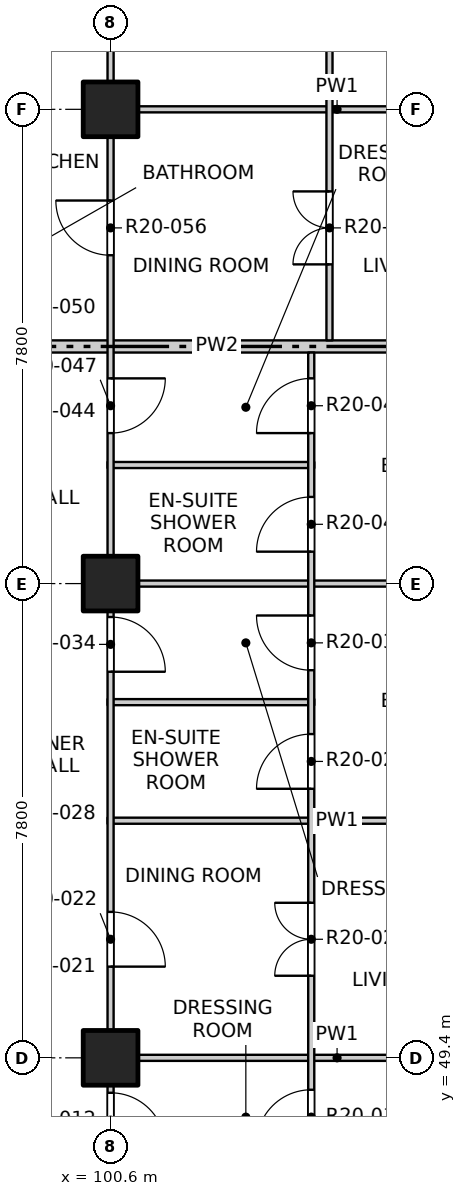
"""IFC4 building model, lengths in metres.
Left out: names, types, materials, properties, quantities, classifications, styles, units other than length and angle.
Written with IfcOpenShell. Run it as: python <this file> out.ifc"""

import sys

from ifc_helpers import new_model, si_unit, direction, frame, frame_2d, origin, origin_2d, place, context, subcontext, project, spatial, rectangle, extrude, element, fill, save


model = new_model("IFC4")
c1 = context("Model", 3, precision=1e-05, world=origin(), true_north=direction((0.0, 1.0)))
c2 = subcontext(c1, "Body", "Model", "MODEL_VIEW")
j1 = project(units=[si_unit("LENGTHUNIT", "METRE"), si_unit("PLANEANGLEUNIT", "RADIAN")], contexts=[c1])
p1 = place(None, origin())
s1 = spatial("IfcSite", under=j1, at=p1, CompositionType="ELEMENT")
p2 = place(p1, origin())
s2 = spatial("IfcBuilding", under=s1, at=p2, CompositionType="ELEMENT")
p3 = place(p2, frame((0.0, 0.0, 210.9)))
s3 = spatial("IfcBuildingStorey", under=s2, at=p3, CompositionType="ELEMENT", Elevation=210.9)
for number, where, z_axis, x_axis in (
    (1, (100.6, 49.4, -0.25), (0.0, 0.0, 1.0), (1.0, 0.0, 0.0)),
    (2, (100.6, 57.2, -0.25), (0.0, 0.0, 1.0), (1.0, 0.0, 0.0)),
    (3, (100.6, 65.0, -0.25), (0.0, 0.0, 1.0), (1.0, 0.0, 0.0)),
):
    element("IfcColumn", number, at=place(p3, frame(where, z_axis=z_axis, x_axis=x_axis)), inside=s3, PredefinedType="COLUMN", context=c2, shape_type="SweptSolid", body=[
        extrude(rectangle(XDim=0.9, YDim=0.9, at=origin_2d()), origin(), (0.0, 0.0, 1.0), 3.4),
    ])
for number, where, z_axis, x_axis in (
    (4, (100.55, 49.4, 0.0), (0.0, 0.0, 1.0), (1.0, 0.0, 0.0)),
    (5, (100.55, 53.3, 0.0), (0.0, 0.0, 1.0), (1.0, 0.0, 0.0)),
):
    element("IfcWall", number, at=place(p3, frame(where, z_axis=z_axis, x_axis=x_axis)), inside=s3, PredefinedType="PARTITIONING", context=c2, shape_type="SweptSolid", body=[
        extrude(rectangle(XDim=7.55, YDim=0.1, at=frame_2d((3.775, 0.0))), origin(), (0.0, 0.0, 1.0), 3.15),
    ])
p4 = place(p3, frame((100.55, 55.25, 0.0), z_axis=(0.0, 0.0, 1.0), x_axis=(1.0, 0.0, 0.0)))
e6 = element("IfcWall", 6, at=p4, inside=s3, PredefinedType="PARTITIONING", context=c2, shape_type="SweptSolid", body=[
    extrude(rectangle(XDim=3.4, YDim=0.1, at=frame_2d((1.7, 0.0))), origin(), (0.0, 0.0, 1.0), 3.15),
])
p5 = place(p3, frame((100.55, 57.2, 0.0), z_axis=(0.0, 0.0, 1.0), x_axis=(1.0, 0.0, 0.0)))
e7 = element("IfcWall", 7, at=p5, inside=s3, PredefinedType="PARTITIONING", context=c2, shape_type="SweptSolid", body=[
    extrude(rectangle(XDim=7.55, YDim=0.1, at=frame_2d((3.775, 0.0))), origin(), (0.0, 0.0, 1.0), 3.15),
])
p6 = place(p3, frame((100.55, 59.15, 0.0), z_axis=(0.0, 0.0, 1.0), x_axis=(1.0, 0.0, 0.0)))
e8 = element("IfcWall", 8, at=p6, inside=s3, PredefinedType="PARTITIONING", context=c2, shape_type="SweptSolid", body=[
    extrude(rectangle(XDim=3.4, YDim=0.1, at=frame_2d((1.7, 0.0))), origin(), (0.0, 0.0, 1.0), 3.15),
])
p7 = place(p3, frame((96.6, 61.1, 0.0), z_axis=(0.0, 0.0, 1.0), x_axis=(1.0, 0.0, 0.0)))
e9 = element("IfcWall", 9, at=p7, inside=s3, PredefinedType="PARTITIONING", context=c2, shape_type="SweptSolid", body=[
    extrude(rectangle(XDim=11.5, YDim=0.2, at=frame_2d((5.75, 0.0))), origin(), (0.0, 0.0, 1.0), 2.55),
])
p8 = place(p3, frame((100.55, 65.0, 0.0), z_axis=(0.0, 0.0, 1.0), x_axis=(1.0, 0.0, 0.0)))
e10 = element("IfcWall", 10, at=p8, inside=s3, PredefinedType="PARTITIONING", context=c2, shape_type="SweptSolid", body=[
    extrude(rectangle(XDim=7.55, YDim=0.1, at=frame_2d((3.775, 0.0))), origin(), (0.0, 0.0, 1.0), 3.15),
])
p9 = place(p3, frame((100.6, 41.9, 0.0), z_axis=(0.0, 0.0, 1.0), x_axis=(0.0, 1.0, 0.0)))
e11 = element("IfcWall", 11, at=p9, inside=s3, PredefinedType="PARTITIONING", context=c2, shape_type="SweptSolid", body=[
    extrude(rectangle(XDim=46.2, YDim=0.1, at=frame_2d((23.1, 0.0))), origin(), (0.0, 0.0, 1.0), 3.15),
])
p10 = place(p9, frame((1.2, 0.0, 0.0)))
e12 = element("IfcOpeningElement", 12, at=p10, cuts=e11, PredefinedType="OPENING", context=c2, shape_type="SweptSolid", body=[
    extrude(rectangle(XDim=0.9, YDim=2.1, at=frame_2d((0.45, 1.05))), frame((0.0, 0.06, 0.0), z_axis=(0.0, -1.0, 0.0), x_axis=(1.0, 0.0, 0.0)), (0.0, 0.0, 1.0), 0.12),
])
p11 = place(p9, frame((6.025, 0.0, 0.0)))
e13 = element("IfcOpeningElement", 13, at=p11, cuts=e11, PredefinedType="OPENING", context=c2, shape_type="SweptSolid", body=[
    extrude(rectangle(XDim=0.9, YDim=2.1, at=frame_2d((0.45, 1.05))), frame((0.0, 0.06, 0.0), z_axis=(0.0, -1.0, 0.0), x_axis=(1.0, 0.0, 0.0)), (0.0, 0.0, 1.0), 0.12),
])
p12 = place(p9, frame((9.0, 0.0, 0.0)))
e14 = element("IfcOpeningElement", 14, at=p12, cuts=e11, PredefinedType="OPENING", context=c2, shape_type="SweptSolid", body=[
    extrude(rectangle(XDim=0.9, YDim=2.1, at=frame_2d((0.45, 1.05))), frame((0.0, 0.06, 0.0), z_axis=(0.0, -1.0, 0.0), x_axis=(1.0, 0.0, 0.0)), (0.0, 0.0, 1.0), 0.12),
])
p13 = place(p9, frame((13.85, 0.0, 0.0)))
e15 = element("IfcOpeningElement", 15, at=p13, cuts=e11, PredefinedType="OPENING", context=c2, shape_type="SweptSolid", body=[
    extrude(rectangle(XDim=0.9, YDim=2.1, at=frame_2d((0.45, 1.05))), frame((0.0, 0.06, 0.0), z_axis=(0.0, -1.0, 0.0), x_axis=(1.0, 0.0, 0.0)), (0.0, 0.0, 1.0), 0.12),
])
p14 = place(p9, frame((17.775, 0.0, 0.0)))
e16 = element("IfcOpeningElement", 16, at=p14, cuts=e11, PredefinedType="OPENING", context=c2, shape_type="SweptSolid", body=[
    extrude(rectangle(XDim=0.9, YDim=2.1, at=frame_2d((0.45, 1.05))), frame((0.0, 0.06, 0.0), z_axis=(0.0, -1.0, 0.0), x_axis=(1.0, 0.0, 0.0)), (0.0, 0.0, 1.0), 0.12),
])
p15 = place(p9, frame((20.7, 0.0, 0.0)))
e17 = element("IfcOpeningElement", 17, at=p15, cuts=e11, PredefinedType="OPENING", context=c2, shape_type="SweptSolid", body=[
    extrude(rectangle(XDim=0.9, YDim=2.1, at=frame_2d((0.45, 1.05))), frame((0.0, 0.06, 0.0), z_axis=(0.0, -1.0, 0.0), x_axis=(1.0, 0.0, 0.0)), (0.0, 0.0, 1.0), 0.12),
])
p16 = place(p9, frame((24.6, 0.0, 0.0)))
e18 = element("IfcOpeningElement", 18, at=p16, cuts=e11, PredefinedType="OPENING", context=c2, shape_type="SweptSolid", body=[
    extrude(rectangle(XDim=0.9, YDim=2.1, at=frame_2d((0.45, 1.05))), frame((0.0, 0.06, 0.0), z_axis=(0.0, -1.0, 0.0), x_axis=(1.0, 0.0, 0.0)), (0.0, 0.0, 1.0), 0.12),
])
p17 = place(p9, frame((29.425, 0.0, 0.0)))
e19 = element("IfcOpeningElement", 19, at=p17, cuts=e11, PredefinedType="OPENING", context=c2, shape_type="SweptSolid", body=[
    extrude(rectangle(XDim=0.9, YDim=2.1, at=frame_2d((0.45, 1.05))), frame((0.0, 0.06, 0.0), z_axis=(0.0, -1.0, 0.0), x_axis=(1.0, 0.0, 0.0)), (0.0, 0.0, 1.0), 0.12),
])
p18 = place(p9, frame((33.375, 0.0, 0.0)))
e20 = element("IfcOpeningElement", 20, at=p18, cuts=e11, PredefinedType="OPENING", context=c2, shape_type="SweptSolid", body=[
    extrude(rectangle(XDim=0.9, YDim=2.1, at=frame_2d((0.45, 1.05))), frame((0.0, 0.06, 0.0), z_axis=(0.0, -1.0, 0.0), x_axis=(1.0, 0.0, 0.0)), (0.0, 0.0, 1.0), 0.12),
])
p19 = place(p9, frame((36.3, 0.0, 0.0)))
e21 = element("IfcOpeningElement", 21, at=p19, cuts=e11, PredefinedType="OPENING", context=c2, shape_type="SweptSolid", body=[
    extrude(rectangle(XDim=0.9, YDim=2.1, at=frame_2d((0.45, 1.05))), frame((0.0, 0.06, 0.0), z_axis=(0.0, -1.0, 0.0), x_axis=(1.0, 0.0, 0.0)), (0.0, 0.0, 1.0), 0.12),
])
p20 = place(p9, frame((41.175, 0.0, 0.0)))
e22 = element("IfcOpeningElement", 22, at=p20, cuts=e11, PredefinedType="OPENING", context=c2, shape_type="SweptSolid", body=[
    extrude(rectangle(XDim=0.9, YDim=2.1, at=frame_2d((0.45, 1.05))), frame((0.0, 0.06, 0.0), z_axis=(0.0, -1.0, 0.0), x_axis=(1.0, 0.0, 0.0)), (0.0, 0.0, 1.0), 0.12),
])
p21 = place(p9, frame((44.1, 0.0, 0.0)))
e23 = element("IfcOpeningElement", 23, at=p21, cuts=e11, PredefinedType="OPENING", context=c2, shape_type="SweptSolid", body=[
    extrude(rectangle(XDim=0.9, YDim=2.1, at=frame_2d((0.45, 1.05))), frame((0.0, 0.06, 0.0), z_axis=(0.0, -1.0, 0.0), x_axis=(1.0, 0.0, 0.0)), (0.0, 0.0, 1.0), 0.12),
])
p22 = place(p3, frame((103.9, 41.9, 0.0), z_axis=(0.0, 0.0, 1.0), x_axis=(0.0, 1.0, 0.0)))
e24 = element("IfcWall", 24, at=p22, inside=s3, PredefinedType="PARTITIONING", context=c2, shape_type="SweptSolid", body=[
    extrude(rectangle(XDim=19.1, YDim=0.1, at=frame_2d((9.55, 0.0))), origin(), (0.0, 0.0, 1.0), 3.15),
])
p23 = place(p22, frame((1.05, 0.0, 0.0)))
e25 = element("IfcOpeningElement", 25, at=p23, cuts=e24, PredefinedType="OPENING", context=c2, shape_type="SweptSolid", body=[
    extrude(rectangle(XDim=1.2, YDim=2.1, at=frame_2d((0.6, 1.05))), frame((0.0, 0.06, 0.0), z_axis=(0.0, -1.0, 0.0), x_axis=(1.0, 0.0, 0.0)), (0.0, 0.0, 1.0), 0.12),
])
p24 = place(p22, frame((4.125, 0.0, 0.0)))
e26 = element("IfcOpeningElement", 26, at=p24, cuts=e24, PredefinedType="OPENING", context=c2, shape_type="SweptSolid", body=[
    extrude(rectangle(XDim=0.9, YDim=2.1, at=frame_2d((0.45, 1.05))), frame((0.0, 0.06, 0.0), z_axis=(0.0, -1.0, 0.0), x_axis=(1.0, 0.0, 0.0)), (0.0, 0.0, 1.0), 0.12),
])
p25 = place(p22, frame((6.075, 0.0, 0.0)))
e27 = element("IfcOpeningElement", 27, at=p25, cuts=e24, PredefinedType="OPENING", context=c2, shape_type="SweptSolid", body=[
    extrude(rectangle(XDim=0.9, YDim=2.1, at=frame_2d((0.45, 1.05))), frame((0.0, 0.06, 0.0), z_axis=(0.0, -1.0, 0.0), x_axis=(1.0, 0.0, 0.0)), (0.0, 0.0, 1.0), 0.12),
])
p26 = place(p22, frame((8.85, 0.0, 0.0)))
e28 = element("IfcOpeningElement", 28, at=p26, cuts=e24, PredefinedType="OPENING", context=c2, shape_type="SweptSolid", body=[
    extrude(rectangle(XDim=1.2, YDim=2.1, at=frame_2d((0.6, 1.05))), frame((0.0, 0.06, 0.0), z_axis=(0.0, -1.0, 0.0), x_axis=(1.0, 0.0, 0.0)), (0.0, 0.0, 1.0), 0.12),
])
p27 = place(p22, frame((11.925, 0.0, 0.0)))
e29 = element("IfcOpeningElement", 29, at=p27, cuts=e24, PredefinedType="OPENING", context=c2, shape_type="SweptSolid", body=[
    extrude(rectangle(XDim=0.9, YDim=2.1, at=frame_2d((0.45, 1.05))), frame((0.0, 0.06, 0.0), z_axis=(0.0, -1.0, 0.0), x_axis=(1.0, 0.0, 0.0)), (0.0, 0.0, 1.0), 0.12),
])
p28 = place(p22, frame((13.875, 0.0, 0.0)))
e30 = element("IfcOpeningElement", 30, at=p28, cuts=e24, PredefinedType="OPENING", context=c2, shape_type="SweptSolid", body=[
    extrude(rectangle(XDim=0.9, YDim=2.1, at=frame_2d((0.45, 1.05))), frame((0.0, 0.06, 0.0), z_axis=(0.0, -1.0, 0.0), x_axis=(1.0, 0.0, 0.0)), (0.0, 0.0, 1.0), 0.12),
])
p29 = place(p22, frame((15.825, 0.0, 0.0)))
e31 = element("IfcOpeningElement", 31, at=p29, cuts=e24, PredefinedType="OPENING", context=c2, shape_type="SweptSolid", body=[
    extrude(rectangle(XDim=0.9, YDim=2.1, at=frame_2d((0.45, 1.05))), frame((0.0, 0.06, 0.0), z_axis=(0.0, -1.0, 0.0), x_axis=(1.0, 0.0, 0.0)), (0.0, 0.0, 1.0), 0.12),
])
p30 = place(p22, frame((17.775, 0.0, 0.0)))
e32 = element("IfcOpeningElement", 32, at=p30, cuts=e24, PredefinedType="OPENING", context=c2, shape_type="SweptSolid", body=[
    extrude(rectangle(XDim=0.9, YDim=2.1, at=frame_2d((0.45, 1.05))), frame((0.0, 0.06, 0.0), z_axis=(0.0, -1.0, 0.0), x_axis=(1.0, 0.0, 0.0)), (0.0, 0.0, 1.0), 0.12),
])
p31 = place(p3, frame((104.2, 61.2, 0.0), z_axis=(0.0, 0.0, 1.0), x_axis=(0.0, 1.0, 0.0)))
e33 = element("IfcWall", 33, at=p31, inside=s3, PredefinedType="PARTITIONING", context=c2, shape_type="SweptSolid", body=[
    extrude(rectangle(XDim=26.9, YDim=0.1, at=frame_2d((13.45, 0.0))), origin(), (0.0, 0.0, 1.0), 3.15),
])
p32 = place(p31, frame((1.25, 0.0, 0.0)))
e34 = element("IfcOpeningElement", 34, at=p32, cuts=e33, PredefinedType="OPENING", context=c2, shape_type="SweptSolid", body=[
    extrude(rectangle(XDim=1.2, YDim=2.1, at=frame_2d((0.6, 1.05))), frame((0.0, 0.06, 0.0), z_axis=(0.0, -1.0, 0.0), x_axis=(1.0, 0.0, 0.0)), (0.0, 0.0, 1.0), 0.12),
])
p33 = place(p31, frame((5.15, 0.0, 0.0)))
e35 = element("IfcOpeningElement", 35, at=p33, cuts=e33, PredefinedType="OPENING", context=c2, shape_type="SweptSolid", body=[
    extrude(rectangle(XDim=1.2, YDim=2.1, at=frame_2d((0.6, 1.05))), frame((0.0, 0.06, 0.0), z_axis=(0.0, -1.0, 0.0), x_axis=(1.0, 0.0, 0.0)), (0.0, 0.0, 1.0), 0.12),
])
p34 = place(p31, frame((8.225, 0.0, 0.0)))
e36 = element("IfcOpeningElement", 36, at=p34, cuts=e33, PredefinedType="OPENING", context=c2, shape_type="SweptSolid", body=[
    extrude(rectangle(XDim=0.9, YDim=2.1, at=frame_2d((0.45, 1.05))), frame((0.0, 0.06, 0.0), z_axis=(0.0, -1.0, 0.0), x_axis=(1.0, 0.0, 0.0)), (0.0, 0.0, 1.0), 0.12),
])
p35 = place(p31, frame((10.175, 0.0, 0.0)))
e37 = element("IfcOpeningElement", 37, at=p35, cuts=e33, PredefinedType="OPENING", context=c2, shape_type="SweptSolid", body=[
    extrude(rectangle(XDim=0.9, YDim=2.1, at=frame_2d((0.45, 1.05))), frame((0.0, 0.06, 0.0), z_axis=(0.0, -1.0, 0.0), x_axis=(1.0, 0.0, 0.0)), (0.0, 0.0, 1.0), 0.12),
])
p36 = place(p31, frame((12.125, 0.0, 0.0)))
e38 = element("IfcOpeningElement", 38, at=p36, cuts=e33, PredefinedType="OPENING", context=c2, shape_type="SweptSolid", body=[
    extrude(rectangle(XDim=0.9, YDim=2.1, at=frame_2d((0.45, 1.05))), frame((0.0, 0.06, 0.0), z_axis=(0.0, -1.0, 0.0), x_axis=(1.0, 0.0, 0.0)), (0.0, 0.0, 1.0), 0.12),
])
p37 = place(p31, frame((14.075, 0.0, 0.0)))
e39 = element("IfcOpeningElement", 39, at=p37, cuts=e33, PredefinedType="OPENING", context=c2, shape_type="SweptSolid", body=[
    extrude(rectangle(XDim=0.9, YDim=2.1, at=frame_2d((0.45, 1.05))), frame((0.0, 0.06, 0.0), z_axis=(0.0, -1.0, 0.0), x_axis=(1.0, 0.0, 0.0)), (0.0, 0.0, 1.0), 0.12),
])
p38 = place(p31, frame((16.85, 0.0, 0.0)))
e40 = element("IfcOpeningElement", 40, at=p38, cuts=e33, PredefinedType="OPENING", context=c2, shape_type="SweptSolid", body=[
    extrude(rectangle(XDim=1.2, YDim=2.1, at=frame_2d((0.6, 1.05))), frame((0.0, 0.06, 0.0), z_axis=(0.0, -1.0, 0.0), x_axis=(1.0, 0.0, 0.0)), (0.0, 0.0, 1.0), 0.12),
])
p39 = place(p31, frame((19.925, 0.0, 0.0)))
e41 = element("IfcOpeningElement", 41, at=p39, cuts=e33, PredefinedType="OPENING", context=c2, shape_type="SweptSolid", body=[
    extrude(rectangle(XDim=0.9, YDim=2.1, at=frame_2d((0.45, 1.05))), frame((0.0, 0.06, 0.0), z_axis=(0.0, -1.0, 0.0), x_axis=(1.0, 0.0, 0.0)), (0.0, 0.0, 1.0), 0.12),
])
p40 = place(p31, frame((21.875, 0.0, 0.0)))
e42 = element("IfcOpeningElement", 42, at=p40, cuts=e33, PredefinedType="OPENING", context=c2, shape_type="SweptSolid", body=[
    extrude(rectangle(XDim=0.9, YDim=2.1, at=frame_2d((0.45, 1.05))), frame((0.0, 0.06, 0.0), z_axis=(0.0, -1.0, 0.0), x_axis=(1.0, 0.0, 0.0)), (0.0, 0.0, 1.0), 0.12),
])
p41 = place(p31, frame((24.65, 0.0, 0.0)))
e43 = element("IfcOpeningElement", 43, at=p41, cuts=e33, PredefinedType="OPENING", context=c2, shape_type="SweptSolid", body=[
    extrude(rectangle(XDim=1.2, YDim=2.1, at=frame_2d((0.6, 1.05))), frame((0.0, 0.06, 0.0), z_axis=(0.0, -1.0, 0.0), x_axis=(1.0, 0.0, 0.0)), (0.0, 0.0, 1.0), 0.12),
])
p42 = place(p11, origin())
e44 = element("IfcDoor", 44, at=p42, inside=s3, OperationType="SINGLE_SWING_RIGHT", PredefinedType="DOOR", context=c2, shape_type="SweptSolid", body=[
    extrude(rectangle(XDim=0.9, YDim=2.1, at=frame_2d((0.45, 1.05))), frame((0.0, 0.025, 0.0), z_axis=(0.0, -1.0, 0.0), x_axis=(1.0, 0.0, 0.0)), (0.0, 0.0, 1.0), 0.05),
])
fill(e13, e44)
p43 = place(p25, origin())
e45 = element("IfcDoor", 45, at=p43, inside=s3, OperationType="SINGLE_SWING_LEFT", PredefinedType="DOOR", context=c2, shape_type="SweptSolid", body=[
    extrude(rectangle(XDim=0.9, YDim=2.1, at=frame_2d((0.45, 1.05))), frame((0.0, 0.025, 0.0), z_axis=(0.0, -1.0, 0.0), x_axis=(1.0, 0.0, 0.0)), (0.0, 0.0, 1.0), 0.05),
])
fill(e27, e45)
p44 = place(p12, origin())
e46 = element("IfcDoor", 46, at=p44, inside=s3, OperationType="SINGLE_SWING_RIGHT", PredefinedType="DOOR", context=c2, shape_type="SweptSolid", body=[
    extrude(rectangle(XDim=0.9, YDim=2.1, at=frame_2d((0.45, 1.05))), frame((0.0, 0.025, 0.0), z_axis=(0.0, -1.0, 0.0), x_axis=(1.0, 0.0, 0.0)), (0.0, 0.0, 1.0), 0.05),
])
fill(e14, e46)
p45 = place(p26, origin())
e47 = element("IfcDoor", 47, at=p45, inside=s3, OperationType="DOUBLE_DOOR_SINGLE_SWING", PredefinedType="DOOR", context=c2, shape_type="SweptSolid", body=[
    extrude(rectangle(XDim=1.2, YDim=2.1, at=frame_2d((0.6, 1.05))), frame((0.0, 0.025, 0.0), z_axis=(0.0, -1.0, 0.0), x_axis=(1.0, 0.0, 0.0)), (0.0, 0.0, 1.0), 0.05),
])
fill(e28, e47)
p46 = place(p27, origin())
e48 = element("IfcDoor", 48, at=p46, inside=s3, OperationType="SINGLE_SWING_LEFT", PredefinedType="DOOR", context=c2, shape_type="SweptSolid", body=[
    extrude(rectangle(XDim=0.9, YDim=2.1, at=frame_2d((0.45, 1.05))), frame((0.0, 0.025, 0.0), z_axis=(0.0, -1.0, 0.0), x_axis=(1.0, 0.0, 0.0)), (0.0, 0.0, 1.0), 0.05),
])
fill(e29, e48)
p47 = place(p13, origin())
e49 = element("IfcDoor", 49, at=p47, inside=s3, OperationType="SINGLE_SWING_RIGHT", PredefinedType="DOOR", context=c2, shape_type="SweptSolid", body=[
    extrude(rectangle(XDim=0.9, YDim=2.1, at=frame_2d((0.45, 1.05))), frame((0.0, 0.025, 0.0), z_axis=(0.0, -1.0, 0.0), x_axis=(1.0, 0.0, 0.0)), (0.0, 0.0, 1.0), 0.05),
])
fill(e15, e49)
p48 = place(p28, origin())
e50 = element("IfcDoor", 50, at=p48, inside=s3, OperationType="SINGLE_SWING_RIGHT", PredefinedType="DOOR", context=c2, shape_type="SweptSolid", body=[
    extrude(rectangle(XDim=0.9, YDim=2.1, at=frame_2d((0.45, 1.05))), frame((0.0, 0.025, 0.0), z_axis=(0.0, -1.0, 0.0), x_axis=(1.0, 0.0, 0.0)), (0.0, 0.0, 1.0), 0.05),
])
fill(e30, e50)
p49 = place(p29, origin())
e51 = element("IfcDoor", 51, at=p49, inside=s3, OperationType="SINGLE_SWING_LEFT", PredefinedType="DOOR", context=c2, shape_type="SweptSolid", body=[
    extrude(rectangle(XDim=0.9, YDim=2.1, at=frame_2d((0.45, 1.05))), frame((0.0, 0.025, 0.0), z_axis=(0.0, -1.0, 0.0), x_axis=(1.0, 0.0, 0.0)), (0.0, 0.0, 1.0), 0.05),
])
fill(e31, e51)
p50 = place(p14, origin())
e52 = element("IfcDoor", 52, at=p50, inside=s3, OperationType="SINGLE_SWING_LEFT", PredefinedType="DOOR", context=c2, shape_type="SweptSolid", body=[
    extrude(rectangle(XDim=0.9, YDim=2.1, at=frame_2d((0.45, 1.05))), frame((0.0, 0.025, 0.0), z_axis=(0.0, -1.0, 0.0), x_axis=(1.0, 0.0, 0.0)), (0.0, 0.0, 1.0), 0.05),
])
fill(e16, e52)
p51 = place(p30, origin())
e53 = element("IfcDoor", 53, at=p51, inside=s3, OperationType="SINGLE_SWING_LEFT", PredefinedType="DOOR", context=c2, shape_type="SweptSolid", body=[
    extrude(rectangle(XDim=0.9, YDim=2.1, at=frame_2d((0.45, 1.05))), frame((0.0, 0.025, 0.0), z_axis=(0.0, -1.0, 0.0), x_axis=(1.0, 0.0, 0.0)), (0.0, 0.0, 1.0), 0.05),
])
fill(e32, e53)
p52 = place(p15, origin())
e54 = element("IfcDoor", 54, at=p52, inside=s3, OperationType="SINGLE_SWING_RIGHT", PredefinedType="DOOR", context=c2, shape_type="SweptSolid", body=[
    extrude(rectangle(XDim=0.9, YDim=2.1, at=frame_2d((0.45, 1.05))), frame((0.0, 0.025, 0.0), z_axis=(0.0, -1.0, 0.0), x_axis=(1.0, 0.0, 0.0)), (0.0, 0.0, 1.0), 0.05),
])
fill(e17, e54)
p53 = place(p32, origin())
e55 = element("IfcDoor", 55, at=p53, inside=s3, OperationType="DOUBLE_DOOR_SINGLE_SWING", PredefinedType="DOOR", context=c2, shape_type="SweptSolid", body=[
    extrude(rectangle(XDim=1.2, YDim=2.1, at=frame_2d((0.6, 1.05))), frame((0.0, 0.025, 0.0), z_axis=(0.0, -1.0, 0.0), x_axis=(1.0, 0.0, 0.0)), (0.0, 0.0, 1.0), 0.05),
])
fill(e34, e55)
save(model, sys.argv[1])
